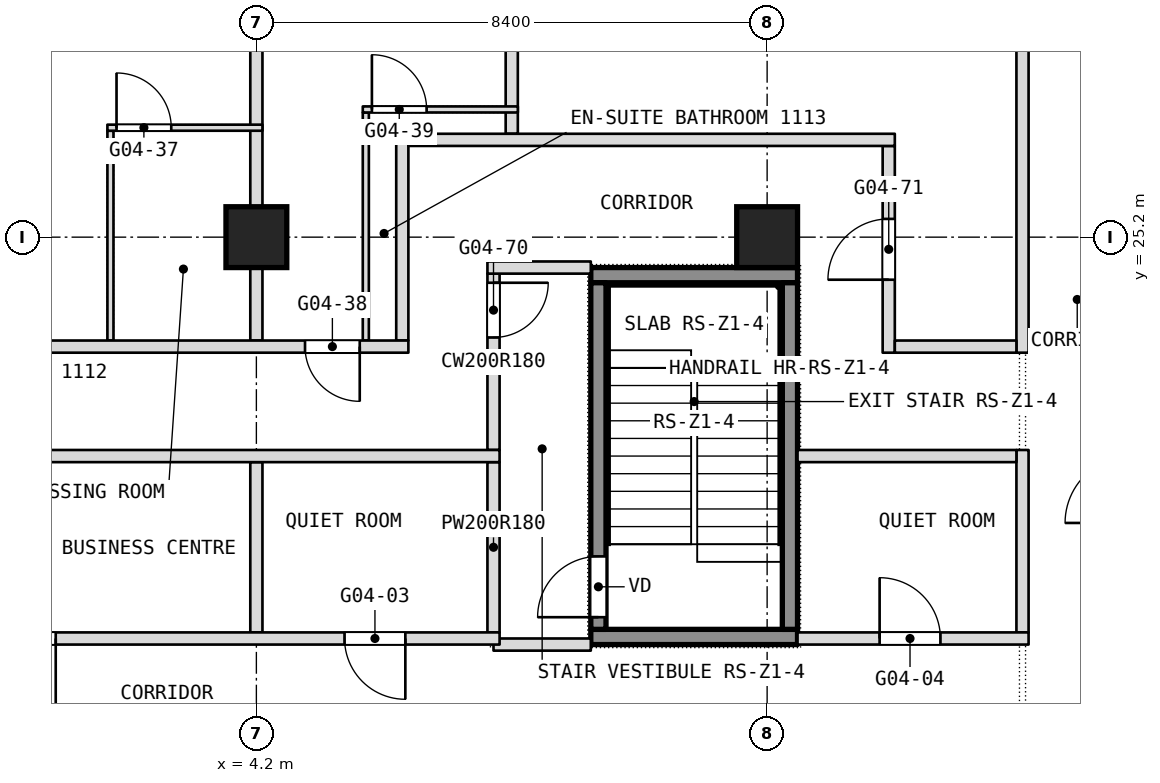
"""IFC4 building model, lengths in metres.
Left out: names, types, materials, properties, quantities, classifications, styles, units other than length and angle.
Written with IfcOpenShell. Run it as: python <this file> out.ifc"""

import sys

from ifc_helpers import new_model, si_unit, direction, frame, frame_2d, origin, origin_2d, place, context, subcontext, project, spatial, rectangle, extrude, element, fill, save


model = new_model("IFC4")
c1 = context("Model", 3, precision=1e-05, world=origin(), true_north=direction((0.0, 1.0)))
c2 = subcontext(c1, "Body", "Model", "MODEL_VIEW")
j1 = project(units=[si_unit("LENGTHUNIT", "METRE"), si_unit("PLANEANGLEUNIT", "RADIAN")], contexts=[c1])
p1 = place(None, origin())
s1 = spatial("IfcSite", under=j1, at=p1, CompositionType="ELEMENT")
p2 = place(p1, origin())
s2 = spatial("IfcBuilding", under=s1, at=p2, CompositionType="ELEMENT")
p3 = place(p2, frame((0.0, 0.0, 54.5)))
s3 = spatial("IfcBuildingStorey", under=s2, at=p3, CompositionType="ELEMENT", Elevation=54.5)
for number, where, z_axis, x_axis in (
    (1, (4.2, 25.2, 0.0), (0.0, 0.0, 1.0), (1.0, 0.0, 0.0)),
    (2, (12.6, 25.2, 0.0), (0.0, 0.0, 1.0), (1.0, 0.0, 0.0)),
):
    element("IfcColumn", number, at=place(p3, frame(where, z_axis=z_axis, x_axis=x_axis)), inside=s3, PredefinedType="COLUMN", context=c2, shape_type="SweptSolid", body=[
        extrude(rectangle(XDim=1.0, YDim=1.0, at=origin_2d()), origin(), (0.0, 0.0, 1.0), 3.6),
    ])
p4 = place(p3, frame((16.8, 18.7, 0.0), z_axis=(0.0, 0.0, 1.0), x_axis=(0.0, 1.0, 0.0)))
e3 = element("IfcWall", 3, at=p4, inside=s3, PredefinedType="PARTITIONING", context=c2, shape_type="SweptSolid", body=[
    extrude(rectangle(XDim=3.0, YDim=0.2, at=frame_2d((1.5, 0.0))), origin(), (0.0, 0.0, 1.0), 3.34),
])
p5 = place(p3, frame((16.8, 23.3, 0.0), z_axis=(0.0, 0.0, 1.0), x_axis=(0.0, 1.0, 0.0)))
e4 = element("IfcWall", 4, at=p5, inside=s3, PredefinedType="PARTITIONING", context=c2, shape_type="SweptSolid", body=[
    extrude(rectangle(XDim=10.24, YDim=0.2, at=frame_2d((5.12, 0.0))), origin(), (0.0, 0.0, 1.0), 3.34),
])
p6 = place(p3, frame((14.6, 23.3, 0.0), z_axis=(0.0, 0.0, 1.0), x_axis=(0.0, 1.0, 0.0)))
e5 = element("IfcWall", 5, at=p6, inside=s3, PredefinedType="PARTITIONING", context=c2, shape_type="SweptSolid", body=[
    extrude(rectangle(XDim=3.4, YDim=0.2, at=frame_2d((1.7, 0.0))), origin(), (0.0, 0.0, 1.0), 3.34),
])
p7 = place(p6, frame((1.2, 0.0, 0.0)))
e6 = element("IfcOpeningElement", 6, at=p7, cuts=e5, PredefinedType="OPENING", context=c2, shape_type="SweptSolid", body=[
    extrude(rectangle(XDim=1.0, YDim=2.1, at=frame_2d((0.5, 1.05))), frame((0.0, 0.1, 0.0), z_axis=(0.0, -1.0, 0.0), x_axis=(1.0, 0.0, 0.0)), (0.0, 0.0, 1.0), 0.2),
])
p8 = place(p3, frame((8.4, 26.9, 0.0), z_axis=(0.0, 0.0, 1.0), x_axis=(0.0, 1.0, 0.0)))
e7 = element("IfcWall", 7, at=p8, inside=s3, PredefinedType="PARTITIONING", context=c2, shape_type="SweptSolid", body=[
    extrude(rectangle(XDim=6.64, YDim=0.2, at=frame_2d((3.32, 0.0))), origin(), (0.0, 0.0, 1.0), 3.34),
])
p9 = place(p3, frame((8.1, 18.7, 0.0), z_axis=(0.0, 0.0, 1.0), x_axis=(0.0, 1.0, 0.0)))
e8 = element("IfcWall", 8, at=p9, inside=s3, PredefinedType="PARTITIONING", context=c2, shape_type="SweptSolid", body=[
    extrude(rectangle(XDim=2.8, YDim=0.2, at=frame_2d((1.4, 0.0))), origin(), (0.0, 0.0, 1.0), 3.34),
])
p10 = place(p3, frame((8.1, 21.7, 0.0), z_axis=(0.0, 0.0, 1.0), x_axis=(0.0, 1.0, 0.0)))
e9 = element("IfcWall", 9, at=p10, inside=s3, PredefinedType="PARTITIONING", context=c2, shape_type="SweptSolid", body=[
    extrude(rectangle(XDim=2.9, YDim=0.2, at=frame_2d((1.45, 0.0))), origin(), (0.0, 0.0, 1.0), 3.34),
])
p11 = place(p10, frame((1.85, 0.0, 0.0)))
e10 = element("IfcOpeningElement", 10, at=p11, cuts=e9, PredefinedType="OPENING", context=c2, shape_type="SweptSolid", body=[
    extrude(rectangle(XDim=0.9, YDim=2.1, at=frame_2d((0.45, 1.05))), frame((0.0, 0.1, 0.0), z_axis=(0.0, -1.0, 0.0), x_axis=(1.0, 0.0, 0.0)), (0.0, 0.0, 1.0), 0.2),
])
p12 = place(p3, frame((6.6, 23.5, 0.0), z_axis=(0.0, 0.0, 1.0), x_axis=(0.0, 1.0, 0.0)))
e11 = element("IfcWall", 11, at=p12, inside=s3, PredefinedType="PARTITIONING", context=c2, shape_type="SweptSolid", body=[
    extrude(rectangle(XDim=3.4, YDim=0.2, at=frame_2d((1.7, 0.0))), origin(), (0.0, 0.0, 1.0), 3.34),
])
p13 = place(p3, frame((6.0, 23.5, 0.0), z_axis=(0.0, 0.0, 1.0), x_axis=(0.0, 1.0, 0.0)))
e12 = element("IfcWall", 12, at=p13, inside=s3, PredefinedType="PARTITIONING", context=c2, shape_type="SweptSolid", body=[
    extrude(rectangle(XDim=3.75, YDim=0.1, at=frame_2d((1.875, 0.0))), origin(), (0.0, 0.0, 1.0), 3.34),
])
p14 = place(p3, frame((4.2, 18.7, 0.0), z_axis=(0.0, 0.0, 1.0), x_axis=(0.0, 1.0, 0.0)))
e13 = element("IfcWall", 13, at=p14, inside=s3, PredefinedType="PARTITIONING", context=c2, shape_type="SweptSolid", body=[
    extrude(rectangle(XDim=2.8, YDim=0.2, at=frame_2d((1.4, 0.0))), origin(), (0.0, 0.0, 1.0), 3.34),
])
p15 = place(p3, frame((4.2, 23.5, 0.0), z_axis=(0.0, 0.0, 1.0), x_axis=(0.0, 1.0, 0.0)))
e14 = element("IfcWall", 14, at=p15, inside=s3, PredefinedType="PARTITIONING", context=c2, shape_type="SweptSolid", body=[
    extrude(rectangle(XDim=10.04, YDim=0.2, at=frame_2d((5.02, 0.0))), origin(), (0.0, 0.0, 1.0), 3.34),
])
p16 = place(p3, frame((1.8, 23.5, 0.0), z_axis=(0.0, 0.0, 1.0), x_axis=(0.0, 1.0, 0.0)))
e15 = element("IfcWall", 15, at=p16, inside=s3, PredefinedType="PARTITIONING", context=c2, shape_type="SweptSolid", body=[
    extrude(rectangle(XDim=3.45, YDim=0.1, at=frame_2d((1.725, 0.0))), origin(), (0.0, 0.0, 1.0), 3.34),
])
p17 = place(p3, frame((8.1, 18.5, 0.0), z_axis=(0.0, 0.0, 1.0), x_axis=(1.0, 0.0, 0.0)))
e16 = element("IfcWall", 16, at=p17, inside=s3, PredefinedType="PARTITIONING", context=c2, shape_type="SweptSolid", body=[
    extrude(rectangle(XDim=1.6, YDim=0.2, at=frame_2d((0.8, 0.0))), origin(), (0.0, 0.0, 1.0), 3.34),
])
p18 = place(p3, frame((-16.9, 18.6, 0.0), z_axis=(0.0, 0.0, 1.0), x_axis=(1.0, 0.0, 0.0)))
e17 = element("IfcWall", 17, at=p18, inside=s3, PredefinedType="PARTITIONING", context=c2, shape_type="SweptSolid", body=[
    extrude(rectangle(XDim=25.1, YDim=0.2, at=frame_2d((12.55, 0.0))), origin(), (0.0, 0.0, 1.0), 3.34),
])
p19 = place(p18, frame((1.7, 0.0, 0.0)))
e18 = element("IfcOpeningElement", 18, at=p19, cuts=e17, PredefinedType="OPENING", context=c2, shape_type="SweptSolid", body=[
    extrude(rectangle(XDim=1.0, YDim=2.1, at=frame_2d((0.5, 1.05))), frame((0.0, 0.1, 0.0), z_axis=(0.0, -1.0, 0.0), x_axis=(1.0, 0.0, 0.0)), (0.0, 0.0, 1.0), 0.2),
])
p20 = place(p18, frame((16.0, 0.0, 0.0)))
e19 = element("IfcOpeningElement", 19, at=p20, cuts=e17, PredefinedType="OPENING", context=c2, shape_type="SweptSolid", body=[
    extrude(rectangle(XDim=1.8, YDim=2.1, at=frame_2d((0.9, 1.05))), frame((0.0, 0.1, 0.0), z_axis=(0.0, -1.0, 0.0), x_axis=(1.0, 0.0, 0.0)), (0.0, 0.0, 1.0), 0.2),
])
p21 = place(p18, frame((22.55, 0.0, 0.0)))
e20 = element("IfcOpeningElement", 20, at=p21, cuts=e17, PredefinedType="OPENING", context=c2, shape_type="SweptSolid", body=[
    extrude(rectangle(XDim=1.0, YDim=2.1, at=frame_2d((0.5, 1.05))), frame((0.0, 0.1, 0.0), z_axis=(0.0, -1.0, 0.0), x_axis=(1.0, 0.0, 0.0)), (0.0, 0.0, 1.0), 0.2),
])
p22 = place(p18, frame((5.9, 0.0, 0.0)))
e21 = element("IfcOpeningElement", 21, at=p22, cuts=e17, PredefinedType="OPENING", context=c2, shape_type="SweptSolid", body=[
    extrude(rectangle(XDim=1.0, YDim=2.1, at=frame_2d((0.5, 1.05))), frame((0.0, 0.1, 0.0), z_axis=(0.0, -1.0, 0.0), x_axis=(1.0, 0.0, 0.0)), (0.0, 0.0, 1.0), 0.2),
])
p23 = place(p18, frame((10.1, 0.0, 0.0)))
e22 = element("IfcOpeningElement", 22, at=p23, cuts=e17, PredefinedType="OPENING", context=c2, shape_type="SweptSolid", body=[
    extrude(rectangle(XDim=1.0, YDim=2.1, at=frame_2d((0.5, 1.05))), frame((0.0, 0.1, 0.0), z_axis=(0.0, -1.0, 0.0), x_axis=(1.0, 0.0, 0.0)), (0.0, 0.0, 1.0), 0.2),
])
p24 = place(p3, frame((13.1, 18.6, 0.0), z_axis=(0.0, 0.0, 1.0), x_axis=(1.0, 0.0, 0.0)))
e23 = element("IfcWall", 23, at=p24, inside=s3, PredefinedType="PARTITIONING", context=c2, shape_type="SweptSolid", body=[
    extrude(rectangle(XDim=3.8, YDim=0.2, at=frame_2d((1.9, 0.0))), origin(), (0.0, 0.0, 1.0), 3.34),
])
p25 = place(p24, frame((1.35, 0.0, 0.0)))
e24 = element("IfcOpeningElement", 24, at=p25, cuts=e23, PredefinedType="OPENING", context=c2, shape_type="SweptSolid", body=[
    extrude(rectangle(XDim=1.0, YDim=2.1, at=frame_2d((0.5, 1.05))), frame((0.0, 0.1, 0.0), z_axis=(0.0, -1.0, 0.0), x_axis=(1.0, 0.0, 0.0)), (0.0, 0.0, 1.0), 0.2),
])
p26 = place(p3, frame((-16.7, 21.6, 0.0), z_axis=(0.0, 0.0, 1.0), x_axis=(1.0, 0.0, 0.0)))
e25 = element("IfcWall", 25, at=p26, inside=s3, PredefinedType="PARTITIONING", context=c2, shape_type="SweptSolid", body=[
    extrude(rectangle(XDim=24.9, YDim=0.2, at=frame_2d((12.45, 0.0))), origin(), (0.0, 0.0, 1.0), 3.34),
])
p27 = place(p3, frame((13.1, 21.6, 0.0), z_axis=(0.0, 0.0, 1.0), x_axis=(1.0, 0.0, 0.0)))
e26 = element("IfcWall", 26, at=p27, inside=s3, PredefinedType="PARTITIONING", context=c2, shape_type="SweptSolid", body=[
    extrude(rectangle(XDim=3.6, YDim=0.2, at=frame_2d((1.8, 0.0))), origin(), (0.0, 0.0, 1.0), 3.34),
])
p28 = place(p3, frame((-16.7, 23.4, 0.0), z_axis=(0.0, 0.0, 1.0), x_axis=(1.0, 0.0, 0.0)))
e27 = element("IfcWall", 27, at=p28, inside=s3, PredefinedType="PARTITIONING", context=c2, shape_type="SweptSolid", body=[
    extrude(rectangle(XDim=23.4, YDim=0.2, at=frame_2d((11.7, 0.0))), origin(), (0.0, 0.0, 1.0), 3.34),
])
p29 = place(p28, frame((2.4, 0.0, 0.0)))
e28 = element("IfcOpeningElement", 28, at=p29, cuts=e27, PredefinedType="OPENING", context=c2, shape_type="SweptSolid", body=[
    extrude(rectangle(XDim=0.9, YDim=2.1, at=frame_2d((0.45, 1.05))), frame((0.0, 0.1, 0.0), z_axis=(0.0, -1.0, 0.0), x_axis=(1.0, 0.0, 0.0)), (0.0, 0.0, 1.0), 0.2),
])
p30 = place(p28, frame((4.9, 0.0, 0.0)))
e29 = element("IfcOpeningElement", 29, at=p30, cuts=e27, PredefinedType="OPENING", context=c2, shape_type="SweptSolid", body=[
    extrude(rectangle(XDim=0.9, YDim=2.1, at=frame_2d((0.45, 1.05))), frame((0.0, 0.1, 0.0), z_axis=(0.0, -1.0, 0.0), x_axis=(1.0, 0.0, 0.0)), (0.0, 0.0, 1.0), 0.2),
])
p31 = place(p28, frame((10.8, 0.0, 0.0)))
e30 = element("IfcOpeningElement", 30, at=p31, cuts=e27, PredefinedType="OPENING", context=c2, shape_type="SweptSolid", body=[
    extrude(rectangle(XDim=0.9, YDim=2.1, at=frame_2d((0.45, 1.05))), frame((0.0, 0.1, 0.0), z_axis=(0.0, -1.0, 0.0), x_axis=(1.0, 0.0, 0.0)), (0.0, 0.0, 1.0), 0.2),
])
p32 = place(p28, frame((16.2, 0.0, 0.0)))
e31 = element("IfcOpeningElement", 31, at=p32, cuts=e27, PredefinedType="OPENING", context=c2, shape_type="SweptSolid", body=[
    extrude(rectangle(XDim=1.1, YDim=2.1, at=frame_2d((0.55, 1.05))), frame((0.0, 0.1, 0.0), z_axis=(0.0, -1.0, 0.0), x_axis=(1.0, 0.0, 0.0)), (0.0, 0.0, 1.0), 0.2),
])
p33 = place(p28, frame((21.7, 0.0, 0.0)))
e32 = element("IfcOpeningElement", 32, at=p33, cuts=e27, PredefinedType="OPENING", context=c2, shape_type="SweptSolid", body=[
    extrude(rectangle(XDim=0.9, YDim=2.1, at=frame_2d((0.45, 1.05))), frame((0.0, 0.1, 0.0), z_axis=(0.0, -1.0, 0.0), x_axis=(1.0, 0.0, 0.0)), (0.0, 0.0, 1.0), 0.2),
])
p34 = place(p3, frame((14.7, 23.4, 0.0), z_axis=(0.0, 0.0, 1.0), x_axis=(1.0, 0.0, 0.0)))
e33 = element("IfcWall", 33, at=p34, inside=s3, PredefinedType="PARTITIONING", context=c2, shape_type="SweptSolid", body=[
    extrude(rectangle(XDim=2.0, YDim=0.2, at=frame_2d((1.0, 0.0))), origin(), (0.0, 0.0, 1.0), 3.34),
])
p35 = place(p3, frame((8.0, 24.7, 0.0), z_axis=(0.0, 0.0, 1.0), x_axis=(1.0, 0.0, 0.0)))
e34 = element("IfcWall", 34, at=p35, inside=s3, PredefinedType="PARTITIONING", context=c2, shape_type="SweptSolid", body=[
    extrude(rectangle(XDim=1.7, YDim=0.2, at=frame_2d((0.85, 0.0))), origin(), (0.0, 0.0, 1.0), 3.34),
])
p36 = place(p3, frame((6.7, 26.8, 0.0), z_axis=(0.0, 0.0, 1.0), x_axis=(1.0, 0.0, 0.0)))
e35 = element("IfcWall", 35, at=p36, inside=s3, PredefinedType="PARTITIONING", context=c2, shape_type="SweptSolid", body=[
    extrude(rectangle(XDim=8.0, YDim=0.2, at=frame_2d((4.0, 0.0))), origin(), (0.0, 0.0, 1.0), 3.34),
])
p37 = place(p3, frame((1.75, 27.0, 0.0), z_axis=(0.0, 0.0, 1.0), x_axis=(1.0, 0.0, 0.0)))
e36 = element("IfcWall", 36, at=p37, inside=s3, PredefinedType="PARTITIONING", context=c2, shape_type="SweptSolid", body=[
    extrude(rectangle(XDim=2.55, YDim=0.1, at=frame_2d((1.275, 0.0))), origin(), (0.0, 0.0, 1.0), 3.34),
])
p38 = place(p37, frame((0.15, 0.0, 0.0)))
e37 = element("IfcOpeningElement", 37, at=p38, cuts=e36, PredefinedType="OPENING", context=c2, shape_type="SweptSolid", body=[
    extrude(rectangle(XDim=0.9, YDim=2.1, at=frame_2d((0.45, 1.05))), frame((0.0, 0.05, 0.0), z_axis=(0.0, -1.0, 0.0), x_axis=(1.0, 0.0, 0.0)), (0.0, 0.0, 1.0), 0.1),
])
p39 = place(p3, frame((5.95, 27.3, 0.0), z_axis=(0.0, 0.0, 1.0), x_axis=(1.0, 0.0, 0.0)))
e38 = element("IfcWall", 38, at=p39, inside=s3, PredefinedType="PARTITIONING", context=c2, shape_type="SweptSolid", body=[
    extrude(rectangle(XDim=2.55, YDim=0.1, at=frame_2d((1.275, 0.0))), origin(), (0.0, 0.0, 1.0), 3.34),
])
p40 = place(p39, frame((0.15, 0.0, 0.0)))
e39 = element("IfcOpeningElement", 39, at=p40, cuts=e38, PredefinedType="OPENING", context=c2, shape_type="SweptSolid", body=[
    extrude(rectangle(XDim=0.9, YDim=2.1, at=frame_2d((0.45, 1.05))), frame((0.0, 0.05, 0.0), z_axis=(0.0, -1.0, 0.0), x_axis=(1.0, 0.0, 0.0)), (0.0, 0.0, 1.0), 0.1),
])
for number, where, z_axis, x_axis in (
    (40, (9.7, 18.625, 0.1), (0.0, 0.0, 1.0), (1.0, 0.0, 0.0)),
    (41, (9.7, 24.575, 0.1), (0.0, 0.0, 1.0), (1.0, 0.0, 0.0)),
):
    element("IfcWall", number, at=place(p3, frame(where, z_axis=z_axis, x_axis=x_axis)), inside=s3, PredefinedType="SHEAR", context=c2, shape_type="SweptSolid", body=[
        extrude(rectangle(XDim=3.4, YDim=0.25, at=frame_2d((1.7, 0.0))), origin(), (0.0, 0.0, 1.0), 3.6),
    ])
p41 = place(p3, frame((9.825, 18.75, 0.1), z_axis=(0.0, 0.0, 1.0), x_axis=(0.0, 1.0, 0.0)))
e42 = element("IfcWall", 42, at=p41, inside=s3, PredefinedType="SHEAR", context=c2, shape_type="SweptSolid", body=[
    extrude(rectangle(XDim=5.7, YDim=0.25, at=frame_2d((2.85, 0.0))), origin(), (0.0, 0.0, 1.0), 3.6),
])
p42 = place(p41, frame((0.2, 0.0, 0.0)))
e43 = element("IfcOpeningElement", 43, at=p42, cuts=e42, PredefinedType="OPENING", context=c2, shape_type="SweptSolid", body=[
    extrude(rectangle(XDim=1.0, YDim=2.1, at=frame_2d((0.5, 1.05))), frame((0.0, 0.125, 0.0), z_axis=(0.0, -1.0, 0.0), x_axis=(1.0, 0.0, 0.0)), (0.0, 0.0, 1.0), 0.25),
])
p43 = place(p3, frame((12.975, 18.75, 0.1), z_axis=(0.0, 0.0, 1.0), x_axis=(0.0, 1.0, 0.0)))
e44 = element("IfcWall", 44, at=p43, inside=s3, PredefinedType="SHEAR", context=c2, shape_type="SweptSolid", body=[
    extrude(rectangle(XDim=5.7, YDim=0.25, at=frame_2d((2.85, 0.0))), origin(), (0.0, 0.0, 1.0), 3.6),
])
p44 = place(p7, origin())
e45 = element("IfcDoor", 45, at=p44, inside=s3, OperationType="SINGLE_SWING_LEFT", PredefinedType="DOOR", context=c2, shape_type="SweptSolid", body=[
    extrude(rectangle(XDim=1.0, YDim=2.1, at=frame_2d((0.5, 1.05))), frame((0.0, 0.025, 0.0), z_axis=(0.0, -1.0, 0.0), x_axis=(1.0, 0.0, 0.0)), (0.0, 0.0, 1.0), 0.05),
])
fill(e6, e45)
p45 = place(p11, origin())
e46 = element("IfcDoor", 46, at=p45, inside=s3, OperationType="SINGLE_SWING_LEFT", PredefinedType="DOOR", context=c2, shape_type="SweptSolid", body=[
    extrude(rectangle(XDim=0.9, YDim=2.1, at=frame_2d((0.45, 1.05))), frame((0.0, 0.025, 0.0), z_axis=(0.0, -1.0, 0.0), x_axis=(1.0, 0.0, 0.0)), (0.0, 0.0, 1.0), 0.05),
])
fill(e10, e46)
p46 = place(p20, origin())
e47 = element("IfcDoor", 47, at=p46, inside=s3, OperationType="DOUBLE_DOOR_SINGLE_SWING", PredefinedType="DOOR", context=c2, shape_type="SweptSolid", body=[
    extrude(rectangle(XDim=1.8, YDim=2.1, at=frame_2d((0.9, 1.05))), frame((0.0, 0.025, 0.0), z_axis=(0.0, -1.0, 0.0), x_axis=(1.0, 0.0, 0.0)), (0.0, 0.0, 1.0), 0.05),
])
fill(e19, e47)
p47 = place(p21, origin())
e48 = element("IfcDoor", 48, at=p47, inside=s3, OperationType="SINGLE_SWING_LEFT", PredefinedType="DOOR", context=c2, shape_type="SweptSolid", body=[
    extrude(rectangle(XDim=1.0, YDim=2.1, at=frame_2d((0.5, 1.05))), frame((0.0, 0.025, 0.0), z_axis=(0.0, -1.0, 0.0), x_axis=(1.0, 0.0, 0.0)), (0.0, 0.0, 1.0), 0.05),
])
fill(e20, e48)
p48 = place(p25, origin())
e49 = element("IfcDoor", 49, at=p48, inside=s3, OperationType="SINGLE_SWING_LEFT", PredefinedType="DOOR", context=c2, shape_type="SweptSolid", body=[
    extrude(rectangle(XDim=1.0, YDim=2.1, at=frame_2d((0.5, 1.05))), frame((0.0, 0.025, 0.0), z_axis=(0.0, -1.0, 0.0), x_axis=(1.0, 0.0, 0.0)), (0.0, 0.0, 1.0), 0.05),
])
fill(e24, e49)
p49 = place(p33, origin())
e50 = element("IfcDoor", 50, at=p49, inside=s3, OperationType="SINGLE_SWING_RIGHT", PredefinedType="DOOR", context=c2, shape_type="SweptSolid", body=[
    extrude(rectangle(XDim=0.9, YDim=2.1, at=frame_2d((0.45, 1.05))), frame((0.0, 0.025, 0.0), z_axis=(0.0, -1.0, 0.0), x_axis=(1.0, 0.0, 0.0)), (0.0, 0.0, 1.0), 0.05),
])
fill(e32, e50)
p50 = place(p38, origin())
e51 = element("IfcDoor", 51, at=p50, inside=s3, OperationType="SINGLE_SWING_RIGHT", PredefinedType="DOOR", context=c2, shape_type="SweptSolid", body=[
    extrude(rectangle(XDim=0.9, YDim=2.1, at=frame_2d((0.45, 1.05))), frame((0.0, 0.025, 0.0), z_axis=(0.0, -1.0, 0.0), x_axis=(1.0, 0.0, 0.0)), (0.0, 0.0, 1.0), 0.05),
])
fill(e37, e51)
p51 = place(p40, origin())
e52 = element("IfcDoor", 52, at=p51, inside=s3, OperationType="SINGLE_SWING_RIGHT", PredefinedType="DOOR", context=c2, shape_type="SweptSolid", body=[
    extrude(rectangle(XDim=0.9, YDim=2.1, at=frame_2d((0.45, 1.05))), frame((0.0, 0.025, 0.0), z_axis=(0.0, -1.0, 0.0), x_axis=(1.0, 0.0, 0.0)), (0.0, 0.0, 1.0), 0.05),
])
fill(e39, e52)
p52 = place(p42, origin())
e53 = element("IfcDoor", 53, at=p52, inside=s3, OperationType="SINGLE_SWING_LEFT", PredefinedType="DOOR", context=c2, shape_type="SweptSolid", body=[
    extrude(rectangle(XDim=1.0, YDim=2.1, at=frame_2d((0.5, 1.05))), frame((0.0, 0.025, 0.0), z_axis=(0.0, -1.0, 0.0), x_axis=(1.0, 0.0, 0.0)), (0.0, 0.0, 1.0), 0.05),
])
fill(e43, e53)
save(model, sys.argv[1])
